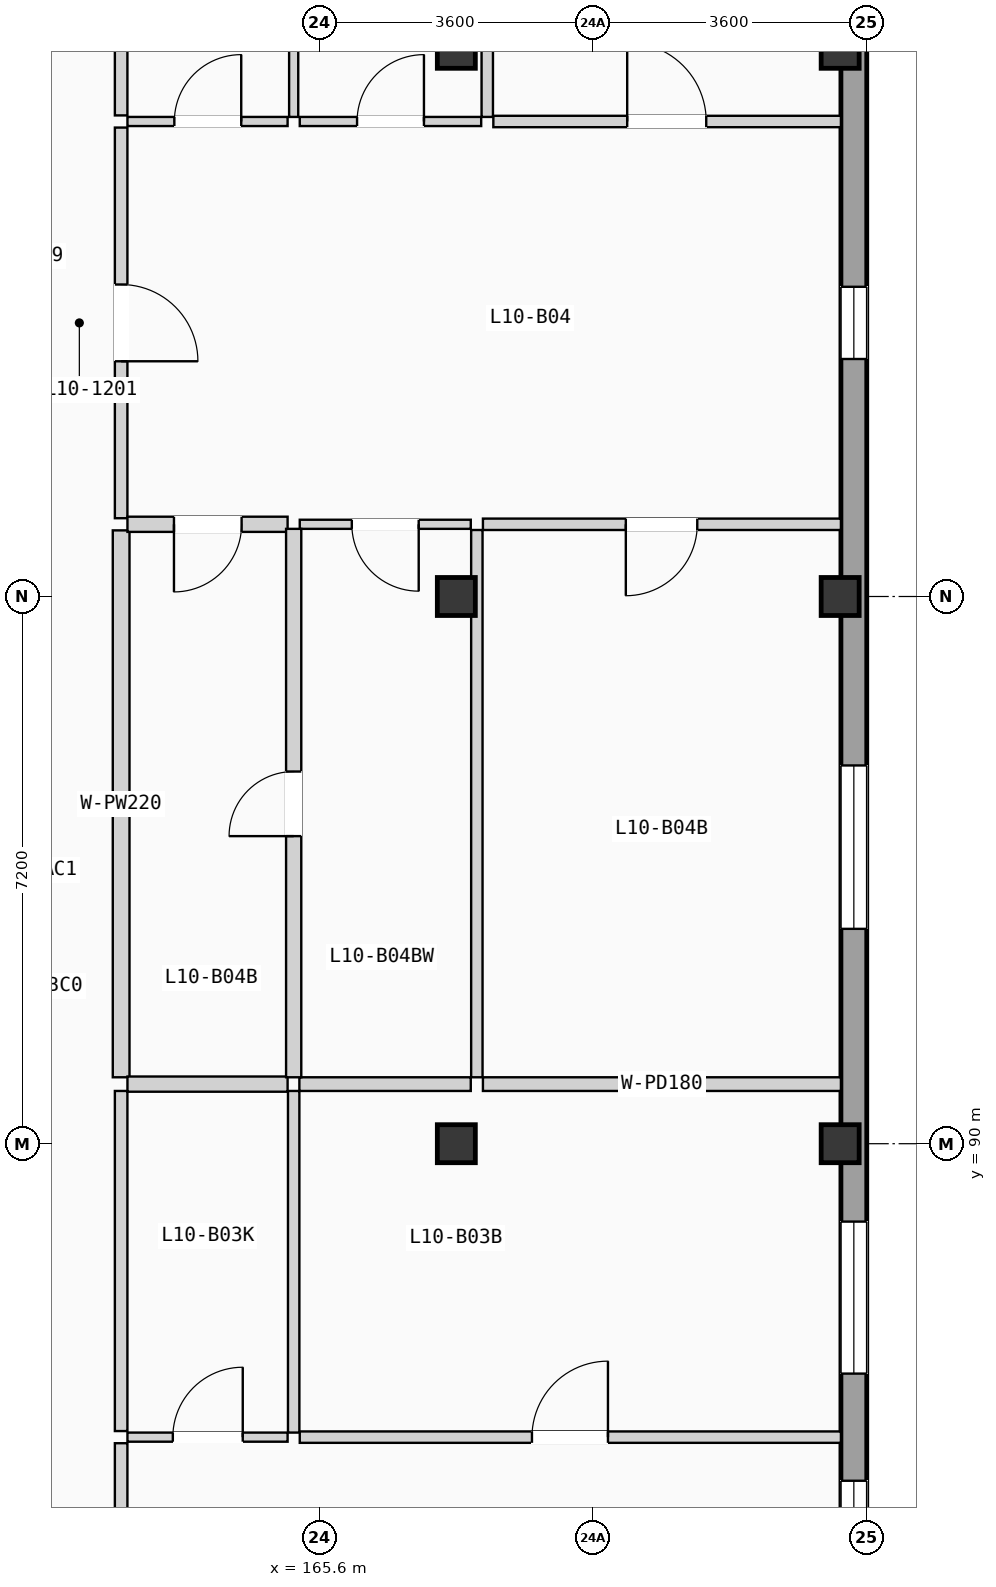
"""IFC4 building model, lengths in metres.
Left out: names, types, materials, properties, quantities, classifications, styles, units other than length and angle.
Written with IfcOpenShell. Run it as: python <this file> out.ifc"""

import sys

from ifc_helpers import new_model, si_unit, direction, frame, frame_2d, origin, origin_2d, place, context, subcontext, project, spatial, rectangle, extrude, element, fill, save


model = new_model("IFC4")
c1 = context("Model", 3, precision=1e-05, world=origin(), true_north=direction((0.0, 1.0)))
c2 = subcontext(c1, "Body", "Model", "MODEL_VIEW")
j1 = project(units=[si_unit("LENGTHUNIT", "METRE"), si_unit("PLANEANGLEUNIT", "RADIAN")], contexts=[c1])
p1 = place(None, origin())
s1 = spatial("IfcSite", under=j1, at=p1, CompositionType="ELEMENT")
p2 = place(p1, origin())
s2 = spatial("IfcBuilding", under=s1, at=p2, CompositionType="ELEMENT")
p3 = place(p2, frame((0.0, 0.0, 34.125)))
s3 = spatial("IfcBuildingStorey", under=s2, at=p3, CompositionType="ELEMENT", Elevation=34.125)
for number, where, z_axis, x_axis in (
    (1, (167.4, 90.0, 0.0), (0.0, 0.0, 1.0), (1.0, 0.0, 0.0)),
    (2, (167.4, 97.2, 0.0), (0.0, 0.0, 1.0), (1.0, 0.0, 0.0)),
    (3, (167.4, 104.4, 0.0), (0.0, 0.0, 1.0), (1.0, 0.0, 0.0)),
    (4, (172.45, 90.0, 0.0), (0.0, 0.0, 1.0), (1.0, 0.0, 0.0)),
    (5, (172.45, 97.2, 0.0), (0.0, 0.0, 1.0), (1.0, 0.0, 0.0)),
    (6, (172.45, 104.4, 0.0), (0.0, 0.0, 1.0), (1.0, 0.0, 0.0)),
):
    element("IfcColumn", number, at=place(p3, frame(where, z_axis=z_axis, x_axis=x_axis)), inside=s3, PredefinedType="COLUMN", context=c2, shape_type="SweptSolid", body=[
        extrude(rectangle(XDim=0.5, YDim=0.5, at=origin_2d()), origin(), (0.0, 0.0, 1.0), 3.15),
    ])
p4 = place(p3, frame((172.63, 68.74, 0.0), z_axis=(0.0, 0.0, 1.0), x_axis=(0.0, 1.0, 0.0)))
e7 = element("IfcWall", 7, at=p4, inside=s3, PredefinedType="SOLIDWALL", context=c2, shape_type="SweptSolid", body=[
    extrude(rectangle(XDim=49.72, YDim=0.34, at=frame_2d((24.86, 0.0))), origin(), (0.0, 0.0, 1.0), 2.89),
])
p5 = place(p4, frame((14.825, 0.0, 0.855)))
e8 = element("IfcOpeningElement", 8, at=p5, cuts=e7, PredefinedType="OPENING", context=c2, shape_type="SweptSolid", body=[
    extrude(rectangle(XDim=2.0, YDim=1.35, at=frame_2d((1.0, 0.675))), frame((0.0, 0.18, 0.0), z_axis=(0.0, -1.0, 0.0), x_axis=(1.0, 0.0, 0.0)), (0.0, 0.0, 1.0), 0.36),
])
p6 = place(p4, frame((8.498, 0.0, 0.705)))
e9 = element("IfcOpeningElement", 9, at=p6, cuts=e7, PredefinedType="OPENING", context=c2, shape_type="SweptSolid", body=[
    extrude(rectangle(XDim=2.0, YDim=1.5, at=frame_2d((1.0, 0.75))), frame((0.0, 0.18, 0.0), z_axis=(0.0, -1.0, 0.0), x_axis=(1.0, 0.0, 0.0)), (0.0, 0.0, 1.0), 0.36),
])
p7 = place(p4, frame((18.235, 0.0, 0.555)))
e10 = element("IfcOpeningElement", 10, at=p7, cuts=e7, PredefinedType="OPENING", context=c2, shape_type="SweptSolid", body=[
    extrude(rectangle(XDim=2.0, YDim=1.65, at=frame_2d((1.0, 0.825))), frame((0.0, 0.18, 0.0), z_axis=(0.0, -1.0, 0.0), x_axis=(1.0, 0.0, 0.0)), (0.0, 0.0, 1.0), 0.36),
])
p8 = place(p4, frame((31.585, 0.0, 0.85)))
e11 = element("IfcOpeningElement", 11, at=p8, cuts=e7, PredefinedType="OPENING", context=c2, shape_type="SweptSolid", body=[
    extrude(rectangle(XDim=0.95, YDim=1.2, at=frame_2d((0.475, 0.6))), frame((0.0, 0.18, 0.0), z_axis=(0.0, -1.0, 0.0), x_axis=(1.0, 0.0, 0.0)), (0.0, 0.0, 1.0), 0.36),
])
p9 = place(p4, frame((24.087, 0.0, 0.9)))
e12 = element("IfcOpeningElement", 12, at=p9, cuts=e7, PredefinedType="OPENING", context=c2, shape_type="SweptSolid", body=[
    extrude(rectangle(XDim=2.15, YDim=1.2, at=frame_2d((1.075, 0.6))), frame((0.0, 0.18, 0.0), z_axis=(0.0, -1.0, 0.0), x_axis=(1.0, 0.0, 0.0)), (0.0, 0.0, 1.0), 0.36),
])
p10 = place(p4, frame((38.12, 0.0, 0.855)))
e13 = element("IfcOpeningElement", 13, at=p10, cuts=e7, PredefinedType="OPENING", context=c2, shape_type="SweptSolid", body=[
    extrude(rectangle(XDim=2.15, YDim=1.35, at=frame_2d((1.075, 0.675))), frame((0.0, 0.18, 0.0), z_axis=(0.0, -1.0, 0.0), x_axis=(1.0, 0.0, 0.0)), (0.0, 0.0, 1.0), 0.36),
])
p11 = place(p3, frame((162.99, 80.635, 0.0), z_axis=(0.0, 0.0, 1.0), x_axis=(0.0, 1.0, 0.0)))
e14 = element("IfcWall", 14, at=p11, inside=s3, PredefinedType="PARTITIONING", context=c2, shape_type="SweptSolid", body=[
    extrude(rectangle(XDim=5.424, YDim=0.165, at=frame_2d((2.712, 0.0))), origin(), (0.0, 0.0, 1.0), 2.87),
])
p12 = place(p11, frame((2.207, 0.0, 0.0)))
e15 = element("IfcOpeningElement", 15, at=p12, cuts=e14, PredefinedType="OPENING", context=c2, shape_type="SweptSolid", body=[
    extrude(rectangle(XDim=1.01, YDim=2.11, at=frame_2d((0.505, 1.055))), frame((0.0, 0.093, 0.0), z_axis=(0.0, -1.0, 0.0), x_axis=(1.0, 0.0, 0.0)), (0.0, 0.0, 1.0), 0.185),
])
p13 = place(p3, frame((162.99, 86.219, 0.0), z_axis=(0.0, 0.0, 1.0), x_axis=(0.0, 1.0, 0.0)))
e16 = element("IfcWall", 16, at=p13, inside=s3, PredefinedType="PARTITIONING", context=c2, shape_type="SweptSolid", body=[
    extrude(rectangle(XDim=4.475, YDim=0.165, at=frame_2d((2.238, 0.0))), origin(), (0.0, 0.0, 1.0), 2.87),
])
p14 = place(p3, frame((162.99, 98.23, 0.0), z_axis=(0.0, 0.0, 1.0), x_axis=(0.0, 1.0, 0.0)))
e17 = element("IfcWall", 17, at=p14, inside=s3, PredefinedType="PARTITIONING", context=c2, shape_type="SweptSolid", body=[
    extrude(rectangle(XDim=5.14, YDim=0.165, at=frame_2d((2.57, 0.0))), origin(), (0.0, 0.0, 1.0), 2.87),
])
p15 = place(p14, frame((2.065, 0.0, 0.0)))
e18 = element("IfcOpeningElement", 18, at=p15, cuts=e17, PredefinedType="OPENING", context=c2, shape_type="SweptSolid", body=[
    extrude(rectangle(XDim=1.01, YDim=2.11, at=frame_2d((0.505, 1.055))), frame((0.0, 0.093, 0.0), z_axis=(0.0, -1.0, 0.0), x_axis=(1.0, 0.0, 0.0)), (0.0, 0.0, 1.0), 0.185),
])
p16 = place(p3, frame((162.99, 90.874, 0.0), z_axis=(0.0, 0.0, 1.0), x_axis=(0.0, 1.0, 0.0)))
e19 = element("IfcWall", 19, at=p16, inside=s3, PredefinedType="PLUMBINGWALL", context=c2, shape_type="SweptSolid", body=[
    extrude(rectangle(XDim=7.196, YDim=0.22, at=frame_2d((3.598, 0.0))), origin(), (0.0, 0.0, 1.0), 2.87),
])
p17 = place(p3, frame((162.99, 103.53, 0.0), z_axis=(0.0, 0.0, 1.0), x_axis=(0.0, 1.0, 0.0)))
e20 = element("IfcWall", 20, at=p17, inside=s3, PredefinedType="PARTITIONING", context=c2, shape_type="SweptSolid", body=[
    extrude(rectangle(XDim=7.67, YDim=0.165, at=frame_2d((3.835, 0.0))), origin(), (0.0, 0.0, 1.0), 2.87),
])
p18 = place(p3, frame((163.073, 86.139, 0.0), z_axis=(0.0, 0.0, 1.0), x_axis=(1.0, 0.0, 0.0)))
e21 = element("IfcWall", 21, at=p18, inside=s3, PredefinedType="PARTITIONING", context=c2, shape_type="SweptSolid", body=[
    extrude(rectangle(XDim=2.107, YDim=0.12, at=frame_2d((1.053, 0.0))), origin(), (0.0, 0.0, 1.0), 2.87),
])
p19 = place(p18, frame((0.597, 0.0, 0.0)))
e22 = element("IfcOpeningElement", 22, at=p19, cuts=e21, PredefinedType="OPENING", context=c2, shape_type="SweptSolid", body=[
    extrude(rectangle(XDim=0.92, YDim=2.02, at=frame_2d((0.46, 1.01))), frame((0.0, 0.07, 0.0), z_axis=(0.0, -1.0, 0.0), x_axis=(1.0, 0.0, 0.0)), (0.0, 0.0, 1.0), 0.14),
])
p20 = place(p3, frame((165.34, 86.139, 0.0), z_axis=(0.0, 0.0, 1.0), x_axis=(1.0, 0.0, 0.0)))
e23 = element("IfcWall", 23, at=p20, inside=s3, PredefinedType="PARTITIONING", context=c2, shape_type="SweptSolid", body=[
    extrude(rectangle(XDim=7.12, YDim=0.15, at=frame_2d((3.56, 0.0))), origin(), (0.0, 0.0, 1.0), 2.87),
])
p21 = place(p20, frame((3.055, 0.0, 0.0)))
e24 = element("IfcOpeningElement", 24, at=p21, cuts=e23, PredefinedType="OPENING", context=c2, shape_type="SweptSolid", body=[
    extrude(rectangle(XDim=1.0, YDim=2.06, at=frame_2d((0.5, 1.03))), frame((0.0, 0.085, 0.0), z_axis=(0.0, -1.0, 0.0), x_axis=(1.0, 0.0, 0.0)), (0.0, 0.0, 1.0), 0.17),
])
p22 = place(p3, frame((165.26, 86.199, 0.0), z_axis=(0.0, 0.0, 1.0), x_axis=(0.0, 1.0, 0.0)))
e25 = element("IfcWall", 25, at=p22, inside=s3, PredefinedType="PARTITIONING", context=c2, shape_type="SweptSolid", body=[
    extrude(rectangle(XDim=4.495, YDim=0.15, at=frame_2d((2.248, 0.0))), origin(), (0.0, 0.0, 1.0), 2.87),
])
p23 = place(p3, frame((163.073, 90.784, 0.0), z_axis=(0.0, 0.0, 1.0), x_axis=(1.0, 0.0, 0.0)))
e26 = element("IfcWall", 26, at=p23, inside=s3, PredefinedType="PLUMBINGWALL", context=c2, shape_type="SweptSolid", body=[
    extrude(rectangle(XDim=2.107, YDim=0.2, at=frame_2d((1.053, 0.0))), origin(), (0.0, 0.0, 1.0), 2.87),
])
p24 = place(p3, frame((167.75, 90.784, 0.0), z_axis=(0.0, 0.0, 1.0), x_axis=(1.0, 0.0, 0.0)))
e27 = element("IfcWall", 27, at=p24, inside=s3, PredefinedType="PARTITIONING", context=c2, shape_type="SweptSolid", body=[
    extrude(rectangle(XDim=4.71, YDim=0.18, at=frame_2d((2.355, 0.0))), origin(), (0.0, 0.0, 1.0), 2.87),
])
p25 = place(p3, frame((165.335, 90.784, 0.0), z_axis=(0.0, 0.0, 1.0), x_axis=(1.0, 0.0, 0.0)))
e28 = element("IfcWall", 28, at=p25, inside=s3, PredefinedType="PARTITIONING", context=c2, shape_type="SweptSolid", body=[
    extrude(rectangle(XDim=2.255, YDim=0.18, at=frame_2d((1.127, 0.0))), origin(), (0.0, 0.0, 1.0), 2.87),
])
p26 = place(p3, frame((163.073, 98.15, 0.0), z_axis=(0.0, 0.0, 1.0), x_axis=(1.0, 0.0, 0.0)))
e29 = element("IfcWall", 29, at=p26, inside=s3, PredefinedType="PLUMBINGWALL", context=c2, shape_type="SweptSolid", body=[
    extrude(rectangle(XDim=2.107, YDim=0.2, at=frame_2d((1.053, 0.0))), origin(), (0.0, 0.0, 1.0), 2.87),
])
p27 = place(p26, frame((0.612, 0.0, 0.0)))
e30 = element("IfcOpeningElement", 30, at=p27, cuts=e29, PredefinedType="OPENING", context=c2, shape_type="SweptSolid", body=[
    extrude(rectangle(XDim=0.89, YDim=2.03, at=frame_2d((0.445, 1.015))), frame((0.0, 0.11, 0.0), z_axis=(0.0, -1.0, 0.0), x_axis=(1.0, 0.0, 0.0)), (0.0, 0.0, 1.0), 0.22),
])
p28 = place(p3, frame((163.073, 103.45, 0.0), z_axis=(0.0, 0.0, 1.0), x_axis=(1.0, 0.0, 0.0)))
e31 = element("IfcWall", 31, at=p28, inside=s3, PredefinedType="PARTITIONING", context=c2, shape_type="SweptSolid", body=[
    extrude(rectangle(XDim=2.107, YDim=0.12, at=frame_2d((1.053, 0.0))), origin(), (0.0, 0.0, 1.0), 2.87),
])
p29 = place(p28, frame((0.617, 0.0, 0.0)))
e32 = element("IfcOpeningElement", 32, at=p29, cuts=e31, PredefinedType="OPENING", context=c2, shape_type="SweptSolid", body=[
    extrude(rectangle(XDim=0.88, YDim=2.02, at=frame_2d((0.44, 1.01))), frame((0.0, 0.07, 0.0), z_axis=(0.0, -1.0, 0.0), x_axis=(1.0, 0.0, 0.0)), (0.0, 0.0, 1.0), 0.14),
])
p30 = place(p3, frame((167.75, 98.15, 0.0), z_axis=(0.0, 0.0, 1.0), x_axis=(1.0, 0.0, 0.0)))
e33 = element("IfcWall", 33, at=p30, inside=s3, PredefinedType="PARTITIONING", context=c2, shape_type="SweptSolid", body=[
    extrude(rectangle(XDim=4.71, YDim=0.15, at=frame_2d((2.355, 0.0))), origin(), (0.0, 0.0, 1.0), 2.87),
])
p31 = place(p30, frame((1.88, 0.0, 0.0)))
e34 = element("IfcOpeningElement", 34, at=p31, cuts=e33, PredefinedType="OPENING", context=c2, shape_type="SweptSolid", body=[
    extrude(rectangle(XDim=0.94, YDim=2.06, at=frame_2d((0.47, 1.03))), frame((0.0, 0.085, 0.0), z_axis=(0.0, -1.0, 0.0), x_axis=(1.0, 0.0, 0.0)), (0.0, 0.0, 1.0), 0.17),
])
p32 = place(p3, frame((165.34, 98.15, 0.0), z_axis=(0.0, 0.0, 1.0), x_axis=(1.0, 0.0, 0.0)))
e35 = element("IfcWall", 35, at=p32, inside=s3, PredefinedType="PARTITIONING", context=c2, shape_type="SweptSolid", body=[
    extrude(rectangle(XDim=2.25, YDim=0.12, at=frame_2d((1.125, 0.0))), origin(), (0.0, 0.0, 1.0), 2.87),
])
p33 = place(p32, frame((0.685, 0.0, 0.0)))
e36 = element("IfcOpeningElement", 36, at=p33, cuts=e35, PredefinedType="OPENING", context=c2, shape_type="SweptSolid", body=[
    extrude(rectangle(XDim=0.88, YDim=2.02, at=frame_2d((0.44, 1.01))), frame((0.0, 0.07, 0.0), z_axis=(0.0, -1.0, 0.0), x_axis=(1.0, 0.0, 0.0)), (0.0, 0.0, 1.0), 0.14),
])
p34 = place(p3, frame((167.887, 103.45, 0.0), z_axis=(0.0, 0.0, 1.0), x_axis=(1.0, 0.0, 0.0)))
e37 = element("IfcWall", 37, at=p34, inside=s3, PredefinedType="PARTITIONING", context=c2, shape_type="SweptSolid", body=[
    extrude(rectangle(XDim=4.573, YDim=0.15, at=frame_2d((2.287, 0.0))), origin(), (0.0, 0.0, 1.0), 2.87),
])
p35 = place(p34, frame((1.761, 0.0, 0.0)))
e38 = element("IfcOpeningElement", 38, at=p35, cuts=e37, PredefinedType="OPENING", context=c2, shape_type="SweptSolid", body=[
    extrude(rectangle(XDim=1.04, YDim=2.08, at=frame_2d((0.52, 1.04))), frame((0.0, 0.085, 0.0), z_axis=(0.0, -1.0, 0.0), x_axis=(1.0, 0.0, 0.0)), (0.0, 0.0, 1.0), 0.17),
])
p36 = place(p3, frame((165.34, 103.45, 0.0), z_axis=(0.0, 0.0, 1.0), x_axis=(1.0, 0.0, 0.0)))
e39 = element("IfcWall", 39, at=p36, inside=s3, PredefinedType="PARTITIONING", context=c2, shape_type="SweptSolid", body=[
    extrude(rectangle(XDim=2.387, YDim=0.12, at=frame_2d((1.193, 0.0))), origin(), (0.0, 0.0, 1.0), 2.87),
])
p37 = place(p36, frame((0.754, 0.0, 0.0)))
e40 = element("IfcOpeningElement", 40, at=p37, cuts=e39, PredefinedType="OPENING", context=c2, shape_type="SweptSolid", body=[
    extrude(rectangle(XDim=0.88, YDim=2.02, at=frame_2d((0.44, 1.01))), frame((0.0, 0.07, 0.0), z_axis=(0.0, -1.0, 0.0), x_axis=(1.0, 0.0, 0.0)), (0.0, 0.0, 1.0), 0.14),
])
p38 = place(p3, frame((165.26, 90.874, 0.0), z_axis=(0.0, 0.0, 1.0), x_axis=(0.0, 1.0, 0.0)))
e41 = element("IfcWall", 41, at=p38, inside=s3, PredefinedType="PLUMBINGWALL", context=c2, shape_type="SweptSolid", body=[
    extrude(rectangle(XDim=7.216, YDim=0.2, at=frame_2d((3.608, 0.0))), origin(), (0.0, 0.0, 1.0), 2.87),
])
p39 = place(p38, frame((3.173, 0.0, 0.0)))
e42 = element("IfcOpeningElement", 42, at=p39, cuts=e41, PredefinedType="OPENING", context=c2, shape_type="SweptSolid", body=[
    extrude(rectangle(XDim=0.85, YDim=2.01, at=frame_2d((0.425, 1.005))), frame((0.0, 0.11, 0.0), z_axis=(0.0, -1.0, 0.0), x_axis=(1.0, 0.0, 0.0)), (0.0, 0.0, 1.0), 0.22),
])
p40 = place(p3, frame((165.26, 103.51, 0.0), z_axis=(0.0, 0.0, 1.0), x_axis=(0.0, 1.0, 0.0)))
e43 = element("IfcWall", 43, at=p40, inside=s3, PredefinedType="PARTITIONING", context=c2, shape_type="SweptSolid", body=[
    extrude(rectangle(XDim=7.69, YDim=0.12, at=frame_2d((3.845, 0.0))), origin(), (0.0, 0.0, 1.0), 2.87),
])
p41 = place(p3, frame((167.67, 90.874, 0.0), z_axis=(0.0, 0.0, 1.0), x_axis=(0.0, 1.0, 0.0)))
e44 = element("IfcWall", 44, at=p41, inside=s3, PredefinedType="PARTITIONING", context=c2, shape_type="SweptSolid", body=[
    extrude(rectangle(XDim=7.201, YDim=0.15, at=frame_2d((3.601, 0.0))), origin(), (0.0, 0.0, 1.0), 2.87),
])
p42 = place(p3, frame((167.807, 103.51, 0.0), z_axis=(0.0, 0.0, 1.0), x_axis=(0.0, 1.0, 0.0)))
e45 = element("IfcWall", 45, at=p42, inside=s3, PredefinedType="PARTITIONING", context=c2, shape_type="SweptSolid", body=[
    extrude(rectangle(XDim=7.69, YDim=0.15, at=frame_2d((3.845, 0.0))), origin(), (0.0, 0.0, 1.0), 2.87),
])
p43 = place(p5, origin())
e46 = element("IfcWindow", 46, at=p43, inside=s3, PartitioningType="DOUBLE_PANEL_VERTICAL", PredefinedType="WINDOW", context=c2, shape_type="SweptSolid", body=[
    extrude(rectangle(XDim=2.0, YDim=1.35, at=frame_2d((1.0, 0.675))), frame((0.0, 0.03, 0.0), z_axis=(0.0, -1.0, 0.0), x_axis=(1.0, 0.0, 0.0)), (0.0, 0.0, 1.0), 0.06),
])
fill(e8, e46)
p44 = place(p7, origin())
e47 = element("IfcWindow", 47, at=p44, inside=s3, PartitioningType="DOUBLE_PANEL_VERTICAL", PredefinedType="WINDOW", context=c2, shape_type="SweptSolid", body=[
    extrude(rectangle(XDim=2.0, YDim=1.65, at=frame_2d((1.0, 0.825))), frame((0.0, 0.03, 0.0), z_axis=(0.0, -1.0, 0.0), x_axis=(1.0, 0.0, 0.0)), (0.0, 0.0, 1.0), 0.06),
])
fill(e10, e47)
p45 = place(p8, origin())
e48 = element("IfcWindow", 48, at=p45, inside=s3, PartitioningType="SINGLE_PANEL", PredefinedType="WINDOW", context=c2, shape_type="SweptSolid", body=[
    extrude(rectangle(XDim=0.95, YDim=1.2, at=frame_2d((0.475, 0.6))), frame((0.0, 0.03, 0.0), z_axis=(0.0, -1.0, 0.0), x_axis=(1.0, 0.0, 0.0)), (0.0, 0.0, 1.0), 0.06),
])
fill(e11, e48)
p46 = place(p9, origin())
e49 = element("IfcWindow", 49, at=p46, inside=s3, PartitioningType="DOUBLE_PANEL_VERTICAL", PredefinedType="WINDOW", context=c2, shape_type="SweptSolid", body=[
    extrude(rectangle(XDim=2.15, YDim=1.2, at=frame_2d((1.075, 0.6))), frame((0.0, 0.03, 0.0), z_axis=(0.0, -1.0, 0.0), x_axis=(1.0, 0.0, 0.0)), (0.0, 0.0, 1.0), 0.06),
])
fill(e12, e49)
p47 = place(p15, frame((1.01, 0.0, 0.0), z_axis=(0.0, 0.0, 1.0), x_axis=(-1.0, 0.0, 0.0)))
e50 = element("IfcDoor", 50, at=p47, inside=s3, OperationType="SINGLE_SWING_LEFT", PredefinedType="DOOR", context=c2, shape_type="SweptSolid", body=[
    extrude(rectangle(XDim=1.01, YDim=2.11, at=frame_2d((0.505, 1.055))), frame((0.0, 0.025, 0.0), z_axis=(0.0, -1.0, 0.0), x_axis=(1.0, 0.0, 0.0)), (0.0, 0.0, 1.0), 0.05),
])
fill(e18, e50)
p48 = place(p19, origin())
e51 = element("IfcDoor", 51, at=p48, inside=s3, OperationType="SINGLE_SWING_RIGHT", PredefinedType="DOOR", context=c2, shape_type="SweptSolid", body=[
    extrude(rectangle(XDim=0.92, YDim=2.02, at=frame_2d((0.46, 1.01))), frame((0.0, 0.025, 0.0), z_axis=(0.0, -1.0, 0.0), x_axis=(1.0, 0.0, 0.0)), (0.0, 0.0, 1.0), 0.05),
])
fill(e22, e51)
p49 = place(p21, origin())
e52 = element("IfcDoor", 52, at=p49, inside=s3, OperationType="SINGLE_SWING_RIGHT", PredefinedType="DOOR", context=c2, shape_type="SweptSolid", body=[
    extrude(rectangle(XDim=1.0, YDim=2.06, at=frame_2d((0.5, 1.03))), frame((0.0, 0.025, 0.0), z_axis=(0.0, -1.0, 0.0), x_axis=(1.0, 0.0, 0.0)), (0.0, 0.0, 1.0), 0.05),
])
fill(e24, e52)
p50 = place(p27, frame((0.89, 0.0, 0.0), z_axis=(0.0, 0.0, 1.0), x_axis=(-1.0, 0.0, 0.0)))
e53 = element("IfcDoor", 53, at=p50, inside=s3, OperationType="SINGLE_SWING_LEFT", PredefinedType="DOOR", context=c2, shape_type="SweptSolid", body=[
    extrude(rectangle(XDim=0.89, YDim=2.03, at=frame_2d((0.445, 1.015))), frame((0.0, 0.025, 0.0), z_axis=(0.0, -1.0, 0.0), x_axis=(1.0, 0.0, 0.0)), (0.0, 0.0, 1.0), 0.05),
])
fill(e30, e53)
p51 = place(p29, origin())
e54 = element("IfcDoor", 54, at=p51, inside=s3, OperationType="SINGLE_SWING_RIGHT", PredefinedType="DOOR", context=c2, shape_type="SweptSolid", body=[
    extrude(rectangle(XDim=0.88, YDim=2.02, at=frame_2d((0.44, 1.01))), frame((0.0, 0.025, 0.0), z_axis=(0.0, -1.0, 0.0), x_axis=(1.0, 0.0, 0.0)), (0.0, 0.0, 1.0), 0.05),
])
fill(e32, e54)
p52 = place(p31, frame((0.94, 0.0, 0.0), z_axis=(0.0, 0.0, 1.0), x_axis=(-1.0, 0.0, 0.0)))
e55 = element("IfcDoor", 55, at=p52, inside=s3, OperationType="SINGLE_SWING_LEFT", PredefinedType="DOOR", context=c2, shape_type="SweptSolid", body=[
    extrude(rectangle(XDim=0.94, YDim=2.06, at=frame_2d((0.47, 1.03))), frame((0.0, 0.025, 0.0), z_axis=(0.0, -1.0, 0.0), x_axis=(1.0, 0.0, 0.0)), (0.0, 0.0, 1.0), 0.05),
])
fill(e34, e55)
p53 = place(p33, frame((0.88, 0.0, 0.0), z_axis=(0.0, 0.0, 1.0), x_axis=(-1.0, 0.0, 0.0)))
e56 = element("IfcDoor", 56, at=p53, inside=s3, OperationType="SINGLE_SWING_RIGHT", PredefinedType="DOOR", context=c2, shape_type="SweptSolid", body=[
    extrude(rectangle(XDim=0.88, YDim=2.02, at=frame_2d((0.44, 1.01))), frame((0.0, 0.025, 0.0), z_axis=(0.0, -1.0, 0.0), x_axis=(1.0, 0.0, 0.0)), (0.0, 0.0, 1.0), 0.05),
])
fill(e36, e56)
p54 = place(p35, origin())
e57 = element("IfcDoor", 57, at=p54, inside=s3, OperationType="SINGLE_SWING_LEFT", PredefinedType="DOOR", context=c2, shape_type="SweptSolid", body=[
    extrude(rectangle(XDim=1.04, YDim=2.08, at=frame_2d((0.52, 1.04))), frame((0.0, 0.025, 0.0), z_axis=(0.0, -1.0, 0.0), x_axis=(1.0, 0.0, 0.0)), (0.0, 0.0, 1.0), 0.05),
])
fill(e38, e57)
p55 = place(p37, origin())
e58 = element("IfcDoor", 58, at=p55, inside=s3, OperationType="SINGLE_SWING_RIGHT", PredefinedType="DOOR", context=c2, shape_type="SweptSolid", body=[
    extrude(rectangle(XDim=0.88, YDim=2.02, at=frame_2d((0.44, 1.01))), frame((0.0, 0.025, 0.0), z_axis=(0.0, -1.0, 0.0), x_axis=(1.0, 0.0, 0.0)), (0.0, 0.0, 1.0), 0.05),
])
fill(e40, e58)
p56 = place(p39, origin())
e59 = element("IfcDoor", 59, at=p56, inside=s3, OperationType="SINGLE_SWING_LEFT", PredefinedType="DOOR", context=c2, shape_type="SweptSolid", body=[
    extrude(rectangle(XDim=0.85, YDim=2.01, at=frame_2d((0.425, 1.005))), frame((0.0, 0.025, 0.0), z_axis=(0.0, -1.0, 0.0), x_axis=(1.0, 0.0, 0.0)), (0.0, 0.0, 1.0), 0.05),
])
fill(e42, e59)
save(model, sys.argv[1])
